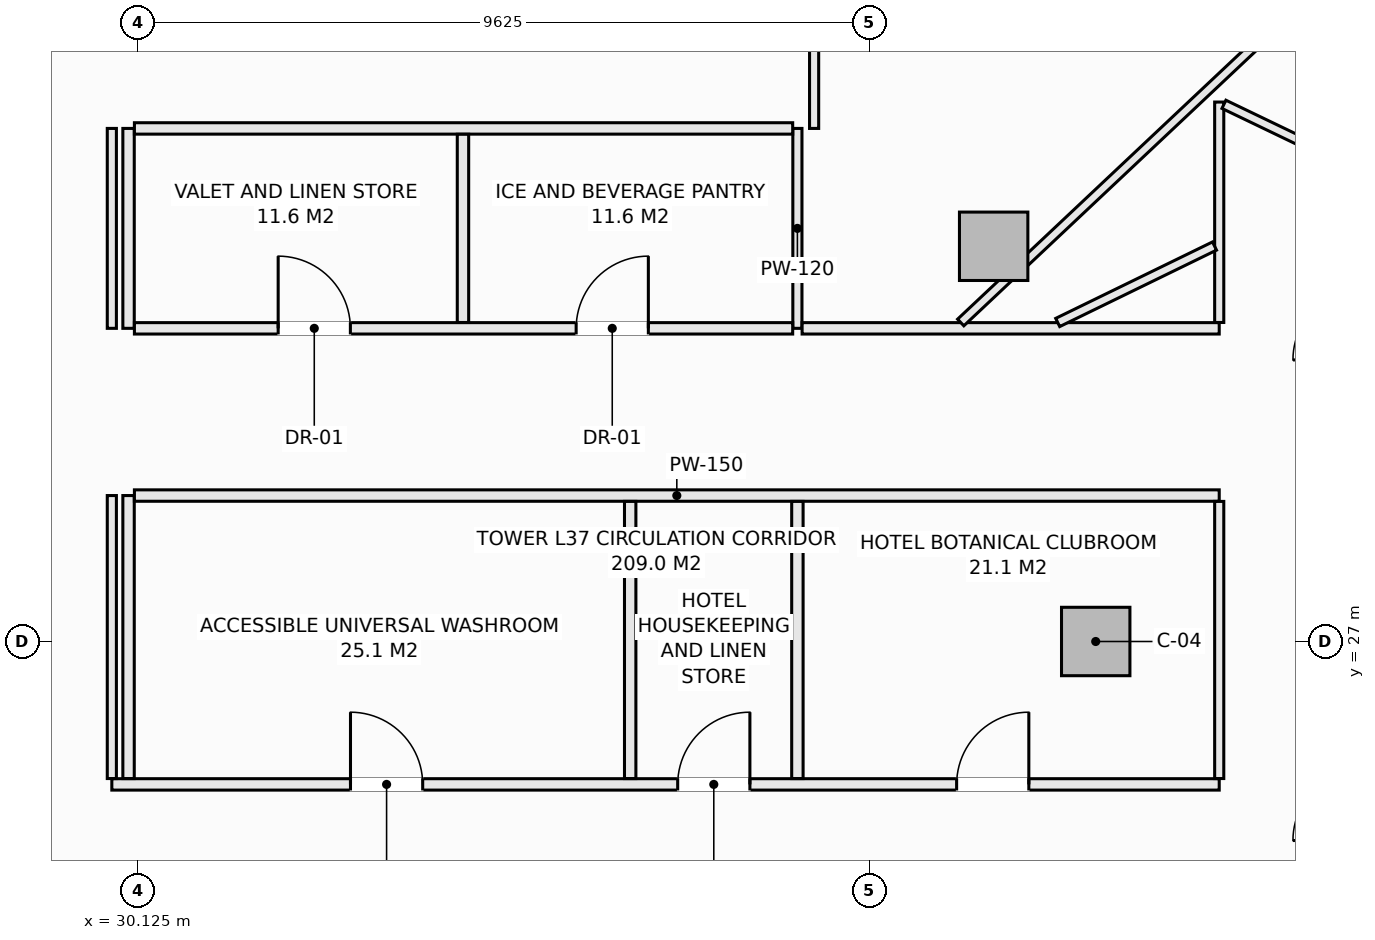
"""IFC4 building model, lengths in metres.
Left out: names, types, materials, properties, quantities, classifications, styles, units other than length and angle.
Written with IfcOpenShell. Run it as: python <this file> out.ifc"""

import sys

from ifc_helpers import new_model, si_unit, direction, frame, frame_2d, origin, origin_2d, place, context, subcontext, project, spatial, rectangle, extrude, element, fill, save


model = new_model("IFC4")
c1 = context("Model", 3, precision=1e-05, world=origin(), true_north=direction((0.0, 1.0)))
c2 = subcontext(c1, "Body", "Model", "MODEL_VIEW")
j1 = project(units=[si_unit("LENGTHUNIT", "METRE"), si_unit("PLANEANGLEUNIT", "RADIAN")], contexts=[c1])
p1 = place(None, origin())
s1 = spatial("IfcSite", under=j1, at=p1, CompositionType="ELEMENT")
p2 = place(p1, origin())
s2 = spatial("IfcBuilding", under=s1, at=p2, CompositionType="ELEMENT")
p3 = place(p2, frame((0.0, 0.0, 146.1)))
s3 = spatial("IfcBuildingStorey", under=s2, at=p3, CompositionType="ELEMENT", Elevation=146.1)
for number, where, z_axis, x_axis in (
    (1, (42.725, 27.0, -0.27), (0.0, 0.0, 1.0), (1.0, 0.0, 0.0)),
    (2, (41.382, 32.199, -0.27), (0.0, 0.0, 1.0), (1.0, 0.0, 0.0)),
):
    element("IfcColumn", number, at=place(p3, frame(where, z_axis=z_axis, x_axis=x_axis)), inside=s3, PredefinedType="COLUMN", context=c2, shape_type="SweptSolid", body=[
        extrude(rectangle(XDim=0.9, YDim=0.9, at=origin_2d()), origin(), (0.0, 0.0, 1.0), 3.4),
    ])
p4 = place(p3, frame((29.78, 25.12, 0.0), z_axis=(0.0, 0.0, 1.0), x_axis=(1.0, 0.0, 0.0)))
e3 = element("IfcWall", 3, at=p4, inside=s3, PredefinedType="PARTITIONING", context=c2, shape_type="SweptSolid", body=[
    extrude(rectangle(XDim=14.57, YDim=0.15, at=frame_2d((7.285, 0.0))), origin(), (0.0, 0.0, 1.0), 3.13),
])
p5 = place(p4, frame((3.14, 0.0, 0.0)))
e4 = element("IfcOpeningElement", 4, at=p5, cuts=e3, PredefinedType="OPENING", context=c2, shape_type="SweptSolid", body=[
    extrude(rectangle(XDim=0.95, YDim=2.1, at=frame_2d((0.475, 1.05))), frame((0.0, 0.085, 0.0), z_axis=(0.0, -1.0, 0.0), x_axis=(1.0, 0.0, 0.0)), (0.0, 0.0, 1.0), 0.17),
])
p6 = place(p4, frame((7.445, 0.0, 0.0)))
e5 = element("IfcOpeningElement", 5, at=p6, cuts=e3, PredefinedType="OPENING", context=c2, shape_type="SweptSolid", body=[
    extrude(rectangle(XDim=0.95, YDim=2.1, at=frame_2d((0.475, 1.05))), frame((0.0, 0.085, 0.0), z_axis=(0.0, -1.0, 0.0), x_axis=(1.0, 0.0, 0.0)), (0.0, 0.0, 1.0), 0.17),
])
p7 = place(p4, frame((11.115, 0.0, 0.0)))
e6 = element("IfcOpeningElement", 6, at=p7, cuts=e3, PredefinedType="OPENING", context=c2, shape_type="SweptSolid", body=[
    extrude(rectangle(XDim=0.95, YDim=2.1, at=frame_2d((0.475, 1.05))), frame((0.0, 0.085, 0.0), z_axis=(0.0, -1.0, 0.0), x_axis=(1.0, 0.0, 0.0)), (0.0, 0.0, 1.0), 0.17),
])
p8 = place(p3, frame((30.0, 25.197, 0.0), z_axis=(0.0, 0.0, 1.0), x_axis=(0.0, 1.0, 0.0)))
e7 = element("IfcWall", 7, at=p8, inside=s3, PredefinedType="PARTITIONING", context=c2, shape_type="SweptSolid", body=[
    extrude(rectangle(XDim=3.723, YDim=0.15, at=frame_2d((1.861, 0.0))), origin(), (0.0, 0.0, 1.0), 3.13),
])
p9 = place(p3, frame((30.0, 31.12, 0.0), z_axis=(0.0, 0.0, 1.0), x_axis=(0.0, 1.0, 0.0)))
e8 = element("IfcWall", 8, at=p9, inside=s3, PredefinedType="PARTITIONING", context=c2, shape_type="SweptSolid", body=[
    extrude(rectangle(XDim=2.63, YDim=0.15, at=frame_2d((1.315, 0.0))), origin(), (0.0, 0.0, 1.0), 3.13),
])
p10 = place(p3, frame((30.077, 28.92, 0.0), z_axis=(0.0, 0.0, 1.0), x_axis=(1.0, 0.0, 0.0)))
e9 = element("IfcWall", 9, at=p10, inside=s3, PredefinedType="PARTITIONING", context=c2, shape_type="SweptSolid", body=[
    extrude(rectangle(XDim=14.273, YDim=0.15, at=frame_2d((7.137, 0.0))), origin(), (0.0, 0.0, 1.0), 3.13),
])
for number, where, z_axis, x_axis in (
    (10, (36.6, 25.197, 0.0), (0.0, 0.0, 1.0), (0.0, 1.0, 0.0)),
    (11, (38.8, 25.197, 0.0), (0.0, 0.0, 1.0), (0.0, 1.0, 0.0)),
):
    element("IfcWall", number, at=place(p3, frame(where, z_axis=z_axis, x_axis=x_axis)), inside=s3, PredefinedType="PARTITIONING", context=c2, shape_type="SweptSolid", body=[
        extrude(rectangle(XDim=3.646, YDim=0.15, at=frame_2d((1.823, 0.0))), origin(), (0.0, 0.0, 1.0), 3.13),
    ])
p11 = place(p3, frame((38.8, 31.12, 0.0), z_axis=(0.0, 0.0, 1.0), x_axis=(0.0, 1.0, 0.0)))
e12 = element("IfcWall", 12, at=p11, inside=s3, PredefinedType="PARTITIONING", context=c2, shape_type="SweptSolid", body=[
    extrude(rectangle(XDim=2.63, YDim=0.12, at=frame_2d((1.315, 0.0))), origin(), (0.0, 0.0, 1.0), 3.13),
])
p12 = place(p3, frame((30.077, 31.12, 0.0), z_axis=(0.0, 0.0, 1.0), x_axis=(1.0, 0.0, 0.0)))
e13 = element("IfcWall", 13, at=p12, inside=s3, PredefinedType="PARTITIONING", context=c2, shape_type="SweptSolid", body=[
    extrude(rectangle(XDim=8.661, YDim=0.15, at=frame_2d((4.331, 0.0))), origin(), (0.0, 0.0, 1.0), 3.13),
])
p13 = place(p12, frame((1.892, 0.0, 0.0)))
e14 = element("IfcOpeningElement", 14, at=p13, cuts=e13, PredefinedType="OPENING", context=c2, shape_type="SweptSolid", body=[
    extrude(rectangle(XDim=0.95, YDim=2.1, at=frame_2d((0.475, 1.05))), frame((0.0, 0.085, 0.0), z_axis=(0.0, -1.0, 0.0), x_axis=(1.0, 0.0, 0.0)), (0.0, 0.0, 1.0), 0.17),
])
p14 = place(p12, frame((5.812, 0.0, 0.0)))
e15 = element("IfcOpeningElement", 15, at=p14, cuts=e13, PredefinedType="OPENING", context=c2, shape_type="SweptSolid", body=[
    extrude(rectangle(XDim=0.95, YDim=2.1, at=frame_2d((0.475, 1.05))), frame((0.0, 0.085, 0.0), z_axis=(0.0, -1.0, 0.0), x_axis=(1.0, 0.0, 0.0)), (0.0, 0.0, 1.0), 0.17),
])
p15 = place(p3, frame((38.862, 31.12, 0.0), z_axis=(0.0, 0.0, 1.0), x_axis=(1.0, 0.0, 0.0)))
e16 = element("IfcWall", 16, at=p15, inside=s3, PredefinedType="PARTITIONING", context=c2, shape_type="SweptSolid", body=[
    extrude(rectangle(XDim=5.488, YDim=0.15, at=frame_2d((2.744, 0.0))), origin(), (0.0, 0.0, 1.0), 3.13),
])
p16 = place(p3, frame((30.077, 33.75, 0.0), z_axis=(0.0, 0.0, 1.0), x_axis=(1.0, 0.0, 0.0)))
e17 = element("IfcWall", 17, at=p16, inside=s3, PredefinedType="PARTITIONING", context=c2, shape_type="SweptSolid", body=[
    extrude(rectangle(XDim=8.661, YDim=0.15, at=frame_2d((4.331, 0.0))), origin(), (0.0, 0.0, 1.0), 3.13),
])
p17 = place(p3, frame((34.4, 31.197, 0.0), z_axis=(0.0, 0.0, 1.0), x_axis=(0.0, 1.0, 0.0)))
e18 = element("IfcWall", 18, at=p17, inside=s3, PredefinedType="PARTITIONING", context=c2, shape_type="SweptSolid", body=[
    extrude(rectangle(XDim=2.476, YDim=0.15, at=frame_2d((1.238, 0.0))), origin(), (0.0, 0.0, 1.0), 3.13),
])
p18 = place(p3, frame((39.02, 33.75, 0.0), z_axis=(0.0, 0.0, 1.0), x_axis=(0.0, 1.0, 0.0)))
e19 = element("IfcWall", 19, at=p18, inside=s3, PredefinedType="PARTITIONING", context=c2, shape_type="SweptSolid", body=[
    extrude(rectangle(XDim=2.0, YDim=0.12, at=frame_2d((1.0, 0.0))), origin(), (0.0, 0.0, 1.0), 3.13),
])
p19 = place(p3, frame((29.78, 25.197, 0.0), z_axis=(0.0, 0.0, 1.0), x_axis=(0.0, 1.0, 0.0)))
e20 = element("IfcWall", 20, at=p19, inside=s3, PredefinedType="PARTITIONING", context=c2, shape_type="SweptSolid", body=[
    extrude(rectangle(XDim=3.723, YDim=0.12, at=frame_2d((1.861, 0.0))), origin(), (0.0, 0.0, 1.0), 3.13),
])
p20 = place(p3, frame((29.78, 31.12, 0.0), z_axis=(0.0, 0.0, 1.0), x_axis=(0.0, 1.0, 0.0)))
e21 = element("IfcWall", 21, at=p20, inside=s3, PredefinedType="PARTITIONING", context=c2, shape_type="SweptSolid", body=[
    extrude(rectangle(XDim=2.63, YDim=0.12, at=frame_2d((1.315, 0.0))), origin(), (0.0, 0.0, 1.0), 3.13),
])
p21 = place(p3, frame((44.35, 25.197, 0.0), z_axis=(0.0, 0.0, 1.0), x_axis=(0.0, 1.0, 0.0)))
e22 = element("IfcWall", 22, at=p21, inside=s3, PredefinedType="PARTITIONING", context=c2, shape_type="SweptSolid", body=[
    extrude(rectangle(XDim=3.646, YDim=0.12, at=frame_2d((1.823, 0.0))), origin(), (0.0, 0.0, 1.0), 3.13),
])
p22 = place(p3, frame((44.35, 31.197, 0.0), z_axis=(0.0, 0.0, 1.0), x_axis=(0.0, 1.0, 0.0)))
e23 = element("IfcWall", 23, at=p22, inside=s3, PredefinedType="PARTITIONING", context=c2, shape_type="SweptSolid", body=[
    extrude(rectangle(XDim=2.9, YDim=0.12, at=frame_2d((1.45, 0.0))), origin(), (0.0, 0.0, 1.0), 3.13),
])
p23 = place(p3, frame((44.412, 34.067, 0.0), z_axis=(0.0, 0.0, 1.0), x_axis=(0.90128266231, -0.433231534656, 0.0)))
e24 = element("IfcWall", 24, at=p23, inside=s3, PredefinedType="PARTITIONING", context=c2, shape_type="SweptSolid", body=[
    extrude(rectangle(XDim=2.062, YDim=0.12, at=frame_2d((1.031, 0.0))), origin(), (0.0, 0.0, 1.0), 3.13),
])
p24 = place(p3, frame((42.225, 31.197, 0.0), z_axis=(0.0, 0.0, 1.0), x_axis=(0.898870643835, 0.438214063732, 0.0)))
e25 = element("IfcWall", 25, at=p24, inside=s3, PredefinedType="PARTITIONING", context=c2, shape_type="SweptSolid", body=[
    extrude(rectangle(XDim=2.295, YDim=0.12, at=frame_2d((1.148, 0.0))), origin(), (0.0, 0.0, 1.0), 3.13),
])
p25 = place(p3, frame((40.949, 31.197, 0.0), z_axis=(0.0, 0.0, 1.0), x_axis=(0.728258728927, 0.685302286397, 0.0)))
e26 = element("IfcWall", 26, at=p25, inside=s3, PredefinedType="PARTITIONING", context=c2, shape_type="SweptSolid", body=[
    extrude(rectangle(XDim=8.053, YDim=0.12, at=frame_2d((4.027, 0.0))), origin(), (0.0, 0.0, 1.0), 2.812),
])
p26 = place(p5, origin())
e27 = element("IfcDoor", 27, at=p26, inside=s3, OperationType="SINGLE_SWING_LEFT", PredefinedType="DOOR", context=c2, shape_type="SweptSolid", body=[
    extrude(rectangle(XDim=0.95, YDim=2.1, at=frame_2d((0.475, 1.05))), frame((0.0, 0.025, 0.0), z_axis=(0.0, -1.0, 0.0), x_axis=(1.0, 0.0, 0.0)), (0.0, 0.0, 1.0), 0.05),
])
fill(e4, e27)
p27 = place(p6, origin())
e28 = element("IfcDoor", 28, at=p27, inside=s3, OperationType="SINGLE_SWING_RIGHT", PredefinedType="DOOR", context=c2, shape_type="SweptSolid", body=[
    extrude(rectangle(XDim=0.95, YDim=2.1, at=frame_2d((0.475, 1.05))), frame((0.0, 0.025, 0.0), z_axis=(0.0, -1.0, 0.0), x_axis=(1.0, 0.0, 0.0)), (0.0, 0.0, 1.0), 0.05),
])
fill(e5, e28)
p28 = place(p13, origin())
e29 = element("IfcDoor", 29, at=p28, inside=s3, OperationType="SINGLE_SWING_LEFT", PredefinedType="DOOR", context=c2, shape_type="SweptSolid", body=[
    extrude(rectangle(XDim=0.95, YDim=2.1, at=frame_2d((0.475, 1.05))), frame((0.0, 0.025, 0.0), z_axis=(0.0, -1.0, 0.0), x_axis=(1.0, 0.0, 0.0)), (0.0, 0.0, 1.0), 0.05),
])
fill(e14, e29)
p29 = place(p14, origin())
e30 = element("IfcDoor", 30, at=p29, inside=s3, OperationType="SINGLE_SWING_RIGHT", PredefinedType="DOOR", context=c2, shape_type="SweptSolid", body=[
    extrude(rectangle(XDim=0.95, YDim=2.1, at=frame_2d((0.475, 1.05))), frame((0.0, 0.025, 0.0), z_axis=(0.0, -1.0, 0.0), x_axis=(1.0, 0.0, 0.0)), (0.0, 0.0, 1.0), 0.05),
])
fill(e15, e30)
p30 = place(p7, origin())
e31 = element("IfcDoor", 31, at=p30, inside=s3, OperationType="SINGLE_SWING_RIGHT", PredefinedType="DOOR", context=c2, shape_type="SweptSolid", body=[
    extrude(rectangle(XDim=0.95, YDim=2.1, at=frame_2d((0.475, 1.05))), frame((0.0, 0.025, 0.0), z_axis=(0.0, -1.0, 0.0), x_axis=(1.0, 0.0, 0.0)), (0.0, 0.0, 1.0), 0.05),
])
fill(e6, e31)
save(model, sys.argv[1])
